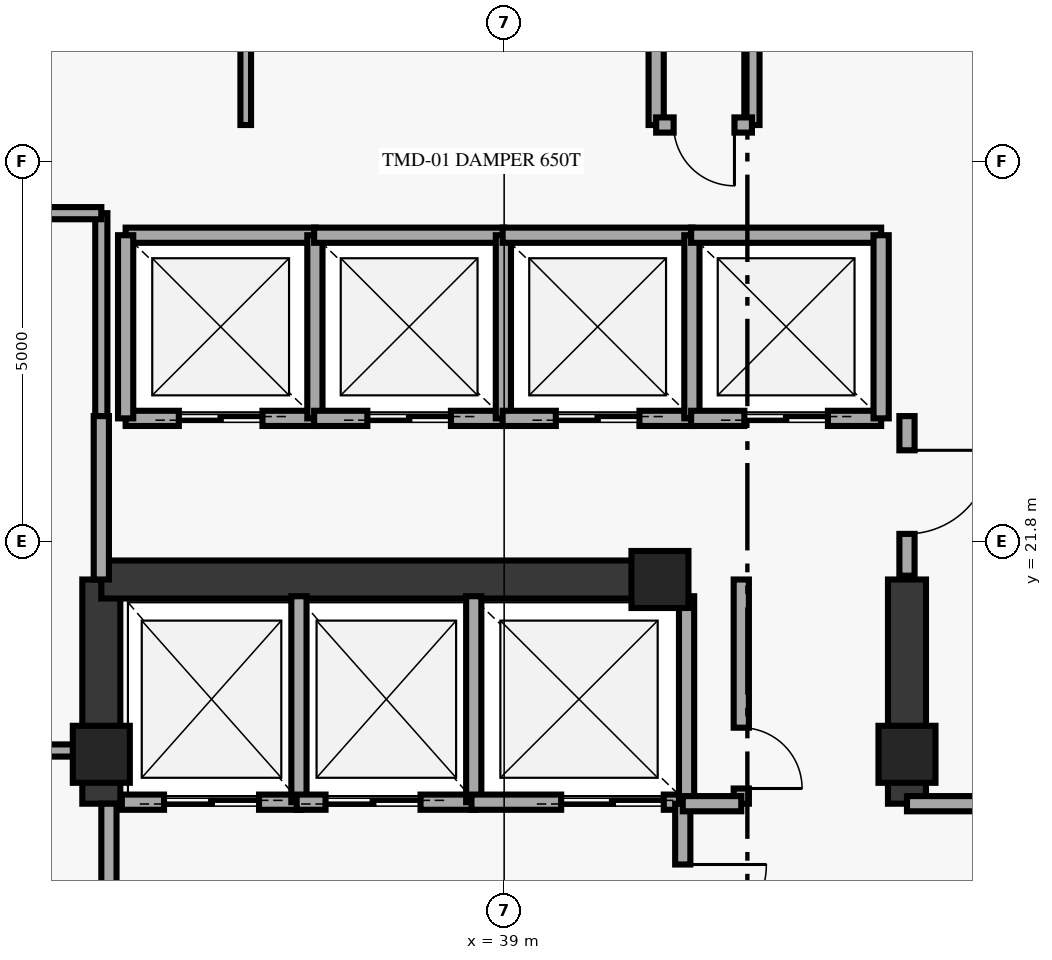
"""IFC4 building model, lengths in metres.
Left out: names, types, materials, properties, quantities, classifications, styles, units other than length and angle.
Written with IfcOpenShell. Run it as: python <this file> out.ifc"""

import sys

from ifc_helpers import new_model, si_unit, direction, frame, frame_2d, origin, origin_2d, place, context, subcontext, project, spatial, rectangle, extrude, element, fill, save


model = new_model("IFC4")
c1 = context("Model", 3, precision=1e-05, world=origin(), true_north=direction((0.0, 1.0)))
c2 = subcontext(c1, "Body", "Model", "MODEL_VIEW")
j1 = project(units=[si_unit("LENGTHUNIT", "METRE"), si_unit("PLANEANGLEUNIT", "RADIAN")], contexts=[c1])
p1 = place(None, origin())
s1 = spatial("IfcSite", under=j1, at=p1, CompositionType="ELEMENT")
p2 = place(p1, origin())
s2 = spatial("IfcBuilding", under=s1, at=p2, CompositionType="ELEMENT")
p3 = place(p2, frame((0.0, 0.0, 306.8)))
s3 = spatial("IfcBuildingStorey", under=s2, at=p3, CompositionType="ELEMENT", Elevation=306.8)
for number, where, z_axis, x_axis in (
    (1, (33.7, 19.0, 0.0), (0.0, 0.0, 1.0), (1.0, 0.0, 0.0)),
    (2, (41.05, 21.3, 0.0), (0.0, 0.0, 1.0), (1.0, 0.0, 0.0)),
    (3, (44.3, 19.0, 0.0), (0.0, 0.0, 1.0), (1.0, 0.0, 0.0)),
):
    element("IfcColumn", number, at=place(p3, frame(where, z_axis=z_axis, x_axis=x_axis)), inside=s3, PredefinedType="PILASTER", context=c2, shape_type="SweptSolid", body=[
        extrude(rectangle(XDim=0.75, YDim=0.75, at=origin_2d()), origin(), (0.0, 0.0, 1.0), 6.18),
    ])
for number, where, z_axis, x_axis in (
    (4, (33.7, 18.35, 0.0), (0.0, 0.0, 1.0), (0.0, 1.0, 0.0)),
    (5, (44.3, 18.35, 0.0), (0.0, 0.0, 1.0), (0.0, 1.0, 0.0)),
):
    element("IfcWall", number, at=place(p3, frame(where, z_axis=z_axis, x_axis=x_axis)), inside=s3, PredefinedType="SHEAR", context=c2, shape_type="SweptSolid", body=[
        extrude(rectangle(XDim=2.95, YDim=0.5, at=frame_2d((1.475, 0.0))), origin(), (0.0, 0.0, 1.0), 6.18),
    ])
p4 = place(p3, frame((33.7, 21.3, 0.0), z_axis=(0.0, 0.0, 1.0), x_axis=(1.0, 0.0, 0.0)))
e6 = element("IfcWall", 6, at=p4, inside=s3, PredefinedType="SHEAR", context=c2, shape_type="SweptSolid", body=[
    extrude(rectangle(XDim=7.55, YDim=0.5, at=frame_2d((3.775, 0.0))), origin(), (0.0, 0.0, 1.0), 6.18),
])
p5 = place(p3, frame((35.6, 27.28, 0.0), z_axis=(0.0, 0.0, 1.0), x_axis=(0.0, 1.0, 0.0)))
e7 = element("IfcWall", 7, at=p5, inside=s3, PredefinedType="PARTITIONING", context=c2, shape_type="SweptSolid", body=[
    extrude(rectangle(XDim=1.77, YDim=0.14, at=frame_2d((0.885, 0.0))), origin(), (0.0, 0.0, 1.0), 6.18),
])
p6 = place(p3, frame((41.0, 27.28, 0.0), z_axis=(0.0, 0.0, 1.0), x_axis=(0.0, 1.0, 0.0)))
e8 = element("IfcWall", 8, at=p6, inside=s3, PredefinedType="SOLIDWALL", context=c2, shape_type="SweptSolid", body=[
    extrude(rectangle(XDim=1.77, YDim=0.2, at=frame_2d((0.885, 0.0))), origin(), (0.0, 0.0, 1.0), 5.23),
])
p7 = place(p3, frame((42.26, 27.28, 0.0), z_axis=(0.0, 0.0, 1.0), x_axis=(0.0, 1.0, 0.0)))
e9 = element("IfcWall", 9, at=p7, inside=s3, PredefinedType="SOLIDWALL", context=c2, shape_type="SweptSolid", body=[
    extrude(rectangle(XDim=1.77, YDim=0.2, at=frame_2d((0.885, 0.0))), origin(), (0.0, 0.0, 1.0), 6.18),
])
p8 = place(p3, frame((41.0, 27.28, 0.0), z_axis=(0.0, 0.0, 1.0), x_axis=(1.0, 0.0, 0.0)))
e10 = element("IfcWall", 10, at=p8, inside=s3, PredefinedType="SOLIDWALL", context=c2, shape_type="SweptSolid", body=[
    extrude(rectangle(XDim=1.26, YDim=0.2, at=frame_2d((0.63, 0.0))), origin(), (0.0, 0.0, 1.0), 6.18),
])
p9 = place(p8, frame((0.23, 0.0, 0.0)))
e11 = element("IfcOpeningElement", 11, at=p9, cuts=e10, PredefinedType="OPENING", context=c2, shape_type="SweptSolid", body=[
    extrude(rectangle(XDim=0.8, YDim=2.05, at=frame_2d((0.4, 1.025))), frame((0.0, 0.11, 0.0), z_axis=(0.0, -1.0, 0.0), x_axis=(1.0, 0.0, 0.0)), (0.0, 0.0, 1.0), 0.22),
])
p10 = place(p3, frame((34.02, 23.42, 0.0), z_axis=(0.0, 0.0, 1.0), x_axis=(1.0, 0.0, 0.0)))
e12 = element("IfcWall", 12, at=p10, inside=s3, PredefinedType="SOLIDWALL", context=c2, shape_type="SweptSolid", body=[
    extrude(rectangle(XDim=2.5, YDim=0.2, at=frame_2d((1.25, 0.0))), origin(), (0.0, 0.0, 1.0), 6.18),
])
p11 = place(p10, frame((0.7, 0.0, 0.0)))
e13 = element("IfcOpeningElement", 13, at=p11, cuts=e12, PredefinedType="OPENING", context=c2, shape_type="SweptSolid", body=[
    extrude(rectangle(XDim=1.1, YDim=2.15, at=frame_2d((0.55, 1.075))), frame((0.0, 0.11, 0.0), z_axis=(0.0, -1.0, 0.0), x_axis=(1.0, 0.0, 0.0)), (0.0, 0.0, 1.0), 0.22),
])
p12 = place(p3, frame((34.02, 25.83, 0.0), z_axis=(0.0, 0.0, 1.0), x_axis=(1.0, 0.0, 0.0)))
e14 = element("IfcWall", 14, at=p12, inside=s3, PredefinedType="SOLIDWALL", context=c2, shape_type="SweptSolid", body=[
    extrude(rectangle(XDim=2.5, YDim=0.2, at=frame_2d((1.25, 0.0))), origin(), (0.0, 0.0, 1.0), 6.18),
])
for number, where, z_axis, x_axis in (
    (15, (34.02, 23.42, 0.0), (0.0, 0.0, 1.0), (0.0, 1.0, 0.0)),
    (16, (36.51, 23.42, 0.0), (0.0, 0.0, 1.0), (0.0, 1.0, 0.0)),
):
    element("IfcWall", number, at=place(p3, frame(where, z_axis=z_axis, x_axis=x_axis)), inside=s3, PredefinedType="SOLIDWALL", context=c2, shape_type="SweptSolid", body=[
        extrude(rectangle(XDim=2.41, YDim=0.2, at=frame_2d((1.205, 0.0))), origin(), (0.0, 0.0, 1.0), 6.18),
    ])
p13 = place(p3, frame((36.5, 23.42, 0.0), z_axis=(0.0, 0.0, 1.0), x_axis=(1.0, 0.0, 0.0)))
e17 = element("IfcWall", 17, at=p13, inside=s3, PredefinedType="SOLIDWALL", context=c2, shape_type="SweptSolid", body=[
    extrude(rectangle(XDim=2.5, YDim=0.2, at=frame_2d((1.25, 0.0))), origin(), (0.0, 0.0, 1.0), 6.18),
])
p14 = place(p13, frame((0.7, 0.0, 0.0)))
e18 = element("IfcOpeningElement", 18, at=p14, cuts=e17, PredefinedType="OPENING", context=c2, shape_type="SweptSolid", body=[
    extrude(rectangle(XDim=1.1, YDim=2.15, at=frame_2d((0.55, 1.075))), frame((0.0, 0.11, 0.0), z_axis=(0.0, -1.0, 0.0), x_axis=(1.0, 0.0, 0.0)), (0.0, 0.0, 1.0), 0.22),
])
p15 = place(p3, frame((36.5, 25.83, 0.0), z_axis=(0.0, 0.0, 1.0), x_axis=(1.0, 0.0, 0.0)))
e19 = element("IfcWall", 19, at=p15, inside=s3, PredefinedType="SOLIDWALL", context=c2, shape_type="SweptSolid", body=[
    extrude(rectangle(XDim=2.5, YDim=0.2, at=frame_2d((1.25, 0.0))), origin(), (0.0, 0.0, 1.0), 6.18),
])
p16 = place(p3, frame((38.99, 23.42, 0.0), z_axis=(0.0, 0.0, 1.0), x_axis=(0.0, 1.0, 0.0)))
e20 = element("IfcWall", 20, at=p16, inside=s3, PredefinedType="SOLIDWALL", context=c2, shape_type="SweptSolid", body=[
    extrude(rectangle(XDim=2.41, YDim=0.2, at=frame_2d((1.205, 0.0))), origin(), (0.0, 0.0, 1.0), 6.18),
])
p17 = place(p3, frame((38.98, 23.42, 0.0), z_axis=(0.0, 0.0, 1.0), x_axis=(1.0, 0.0, 0.0)))
e21 = element("IfcWall", 21, at=p17, inside=s3, PredefinedType="SOLIDWALL", context=c2, shape_type="SweptSolid", body=[
    extrude(rectangle(XDim=2.5, YDim=0.2, at=frame_2d((1.25, 0.0))), origin(), (0.0, 0.0, 1.0), 6.18),
])
p18 = place(p17, frame((0.7, 0.0, 0.0)))
e22 = element("IfcOpeningElement", 22, at=p18, cuts=e21, PredefinedType="OPENING", context=c2, shape_type="SweptSolid", body=[
    extrude(rectangle(XDim=1.1, YDim=2.15, at=frame_2d((0.55, 1.075))), frame((0.0, 0.11, 0.0), z_axis=(0.0, -1.0, 0.0), x_axis=(1.0, 0.0, 0.0)), (0.0, 0.0, 1.0), 0.22),
])
p19 = place(p3, frame((38.98, 25.83, 0.0), z_axis=(0.0, 0.0, 1.0), x_axis=(1.0, 0.0, 0.0)))
e23 = element("IfcWall", 23, at=p19, inside=s3, PredefinedType="SOLIDWALL", context=c2, shape_type="SweptSolid", body=[
    extrude(rectangle(XDim=2.5, YDim=0.2, at=frame_2d((1.25, 0.0))), origin(), (0.0, 0.0, 1.0), 6.18),
])
p20 = place(p3, frame((41.47, 23.42, 0.0), z_axis=(0.0, 0.0, 1.0), x_axis=(0.0, 1.0, 0.0)))
e24 = element("IfcWall", 24, at=p20, inside=s3, PredefinedType="SOLIDWALL", context=c2, shape_type="SweptSolid", body=[
    extrude(rectangle(XDim=2.41, YDim=0.2, at=frame_2d((1.205, 0.0))), origin(), (0.0, 0.0, 1.0), 6.18),
])
p21 = place(p3, frame((41.46, 23.42, 0.0), z_axis=(0.0, 0.0, 1.0), x_axis=(1.0, 0.0, 0.0)))
e25 = element("IfcWall", 25, at=p21, inside=s3, PredefinedType="SOLIDWALL", context=c2, shape_type="SweptSolid", body=[
    extrude(rectangle(XDim=2.5, YDim=0.2, at=frame_2d((1.25, 0.0))), origin(), (0.0, 0.0, 1.0), 6.18),
])
p22 = place(p21, frame((0.7, 0.0, 0.0)))
e26 = element("IfcOpeningElement", 26, at=p22, cuts=e25, PredefinedType="OPENING", context=c2, shape_type="SweptSolid", body=[
    extrude(rectangle(XDim=1.1, YDim=2.15, at=frame_2d((0.55, 1.075))), frame((0.0, 0.11, 0.0), z_axis=(0.0, -1.0, 0.0), x_axis=(1.0, 0.0, 0.0)), (0.0, 0.0, 1.0), 0.22),
])
p23 = place(p3, frame((41.46, 25.83, 0.0), z_axis=(0.0, 0.0, 1.0), x_axis=(1.0, 0.0, 0.0)))
e27 = element("IfcWall", 27, at=p23, inside=s3, PredefinedType="SOLIDWALL", context=c2, shape_type="SweptSolid", body=[
    extrude(rectangle(XDim=2.5, YDim=0.2, at=frame_2d((1.25, 0.0))), origin(), (0.0, 0.0, 1.0), 6.18),
])
p24 = place(p3, frame((43.96, 23.42, 0.0), z_axis=(0.0, 0.0, 1.0), x_axis=(0.0, 1.0, 0.0)))
e28 = element("IfcWall", 28, at=p24, inside=s3, PredefinedType="SOLIDWALL", context=c2, shape_type="SweptSolid", body=[
    extrude(rectangle(XDim=2.41, YDim=0.2, at=frame_2d((1.205, 0.0))), origin(), (0.0, 0.0, 1.0), 6.18),
])
p25 = place(p3, frame((33.97, 18.37, 0.0), z_axis=(0.0, 0.0, 1.0), x_axis=(1.0, 0.0, 0.0)))
e29 = element("IfcWall", 29, at=p25, inside=s3, PredefinedType="SOLIDWALL", context=c2, shape_type="SweptSolid", body=[
    extrude(rectangle(XDim=2.36, YDim=0.2, at=frame_2d((1.18, 0.0))), origin(), (0.0, 0.0, 1.0), 6.18),
])
p26 = place(p25, frame((0.555, 0.0, 0.0)))
e30 = element("IfcOpeningElement", 30, at=p26, cuts=e29, PredefinedType="OPENING", context=c2, shape_type="SweptSolid", body=[
    extrude(rectangle(XDim=1.25, YDim=2.2, at=frame_2d((0.625, 1.1))), frame((0.0, 0.11, 0.0), z_axis=(0.0, -1.0, 0.0), x_axis=(1.0, 0.0, 0.0)), (0.0, 0.0, 1.0), 0.22),
])
p27 = place(p3, frame((36.3, 18.37, 0.0), z_axis=(0.0, 0.0, 1.0), x_axis=(0.0, 1.0, 0.0)))
e31 = element("IfcWall", 31, at=p27, inside=s3, PredefinedType="SOLIDWALL", context=c2, shape_type="SweptSolid", body=[
    extrude(rectangle(XDim=2.71, YDim=0.2, at=frame_2d((1.355, 0.0))), origin(), (0.0, 0.0, 1.0), 6.18),
])
p28 = place(p3, frame((36.27, 18.37, 0.0), z_axis=(0.0, 0.0, 1.0), x_axis=(1.0, 0.0, 0.0)))
e32 = element("IfcWall", 32, at=p28, inside=s3, PredefinedType="SOLIDWALL", context=c2, shape_type="SweptSolid", body=[
    extrude(rectangle(XDim=2.36, YDim=0.2, at=frame_2d((1.18, 0.0))), origin(), (0.0, 0.0, 1.0), 6.18),
])
p29 = place(p28, frame((0.38, 0.0, 0.0)))
e33 = element("IfcOpeningElement", 33, at=p29, cuts=e32, PredefinedType="OPENING", context=c2, shape_type="SweptSolid", body=[
    extrude(rectangle(XDim=1.25, YDim=2.2, at=frame_2d((0.625, 1.1))), frame((0.0, 0.11, 0.0), z_axis=(0.0, -1.0, 0.0), x_axis=(1.0, 0.0, 0.0)), (0.0, 0.0, 1.0), 0.22),
])
p30 = place(p3, frame((38.6, 18.37, 0.0), z_axis=(0.0, 0.0, 1.0), x_axis=(0.0, 1.0, 0.0)))
e34 = element("IfcWall", 34, at=p30, inside=s3, PredefinedType="SOLIDWALL", context=c2, shape_type="SweptSolid", body=[
    extrude(rectangle(XDim=2.71, YDim=0.2, at=frame_2d((1.355, 0.0))), origin(), (0.0, 0.0, 1.0), 6.18),
])
p31 = place(p3, frame((38.57, 18.37, 0.0), z_axis=(0.0, 0.0, 1.0), x_axis=(1.0, 0.0, 0.0)))
e35 = element("IfcWall", 35, at=p31, inside=s3, PredefinedType="SOLIDWALL", context=c2, shape_type="SweptSolid", body=[
    extrude(rectangle(XDim=2.83, YDim=0.2, at=frame_2d((1.415, 0.0))), origin(), (0.0, 0.0, 1.0), 6.18),
])
p32 = place(p31, frame((1.18, 0.0, 0.0)))
e36 = element("IfcOpeningElement", 36, at=p32, cuts=e35, PredefinedType="OPENING", context=c2, shape_type="SweptSolid", body=[
    extrude(rectangle(XDim=1.35, YDim=2.18, at=frame_2d((0.675, 1.09))), frame((0.0, 0.11, 0.0), z_axis=(0.0, -1.0, 0.0), x_axis=(1.0, 0.0, 0.0)), (0.0, 0.0, 1.0), 0.22),
])
p33 = place(p3, frame((41.4, 18.37, 0.0), z_axis=(0.0, 0.0, 1.0), x_axis=(0.0, 1.0, 0.0)))
e37 = element("IfcWall", 37, at=p33, inside=s3, PredefinedType="SOLIDWALL", context=c2, shape_type="SweptSolid", body=[
    extrude(rectangle(XDim=2.71, YDim=0.2, at=frame_2d((1.355, 0.0))), origin(), (0.0, 0.0, 1.0), 6.18),
])
p34 = place(p3, frame((29.05, 19.05, 0.0), z_axis=(0.0, 0.0, 1.0), x_axis=(1.0, 0.0, 0.0)))
e38 = element("IfcWall", 38, at=p34, inside=s3, PredefinedType="PARTITIONING", context=c2, shape_type="SweptSolid", body=[
    extrude(rectangle(XDim=4.65, YDim=0.16, at=frame_2d((2.325, 0.0))), origin(), (0.0, 0.0, 1.0), 6.18),
])
p35 = place(p3, frame((33.7, 23.45, 0.0), z_axis=(0.0, 0.0, 1.0), x_axis=(0.0, 1.0, 0.0)))
e39 = element("IfcWall", 39, at=p35, inside=s3, PredefinedType="PARTITIONING", context=c2, shape_type="SweptSolid", body=[
    extrude(rectangle(XDim=2.67, YDim=0.16, at=frame_2d((1.335, 0.0))), origin(), (0.0, 0.0, 1.0), 6.18),
])
p36 = place(p3, frame((33.7, 26.12, 0.0), z_axis=(0.0, 0.0, 1.0), x_axis=(-1.0, 0.0, 0.0)))
e40 = element("IfcWall", 40, at=p36, inside=s3, PredefinedType="PARTITIONING", context=c2, shape_type="SweptSolid", body=[
    extrude(rectangle(XDim=4.65, YDim=0.16, at=frame_2d((2.325, 0.0))), origin(), (0.0, 0.0, 1.0), 6.18),
])
p37 = place(p36, frame((3.1, 0.0, 0.0)))
e41 = element("IfcOpeningElement", 41, at=p37, cuts=e40, PredefinedType="OPENING", context=c2, shape_type="SweptSolid", body=[
    extrude(rectangle(XDim=0.9, YDim=2.1, at=frame_2d((0.45, 1.05))), frame((0.0, 0.09, 0.0), z_axis=(0.0, -1.0, 0.0), x_axis=(1.0, 0.0, 0.0)), (0.0, 0.0, 1.0), 0.18),
])
p38 = place(p36, frame((0.9, 0.0, 0.0)))
e42 = element("IfcOpeningElement", 42, at=p38, cuts=e40, PredefinedType="OPENING", context=c2, shape_type="SweptSolid", body=[
    extrude(rectangle(XDim=0.9, YDim=2.1, at=frame_2d((0.45, 1.05))), frame((0.0, 0.09, 0.0), z_axis=(0.0, -1.0, 0.0), x_axis=(1.0, 0.0, 0.0)), (0.0, 0.0, 1.0), 0.18),
])
p39 = place(p3, frame((33.7, 21.3, 0.0), z_axis=(0.0, 0.0, 1.0), x_axis=(0.0, 1.0, 0.0)))
e43 = element("IfcWall", 43, at=p39, inside=s3, PredefinedType="SOLIDWALL", context=c2, shape_type="SweptSolid", body=[
    extrude(rectangle(XDim=2.15, YDim=0.2, at=frame_2d((1.075, 0.0))), origin(), (0.0, 0.0, 1.0), 6.18),
])
p40 = place(p3, frame((44.3, 21.35, 0.0), z_axis=(0.0, 0.0, 1.0), x_axis=(0.0, 1.0, 0.0)))
e44 = element("IfcWall", 44, at=p40, inside=s3, PredefinedType="SOLIDWALL", context=c2, shape_type="SweptSolid", body=[
    extrude(rectangle(XDim=2.1, YDim=0.2, at=frame_2d((1.05, 0.0))), origin(), (0.0, 0.0, 1.0), 6.18),
])
p41 = place(p40, frame((0.55, 0.0, 0.0)))
e45 = element("IfcOpeningElement", 45, at=p41, cuts=e44, PredefinedType="OPENING", context=c2, shape_type="SweptSolid", body=[
    extrude(rectangle(XDim=1.1, YDim=2.15, at=frame_2d((0.55, 1.075))), frame((0.0, 0.11, 0.0), z_axis=(0.0, -1.0, 0.0), x_axis=(1.0, 0.0, 0.0)), (0.0, 0.0, 1.0), 0.22),
])
p42 = place(p3, frame((33.8, 15.55, 0.0), z_axis=(0.0, 0.0, 1.0), x_axis=(0.0, 1.0, 0.0)))
e46 = element("IfcWall", 46, at=p42, inside=s3, PredefinedType="SOLIDWALL", context=c2, shape_type="SweptSolid", body=[
    extrude(rectangle(XDim=2.8, YDim=0.2, at=frame_2d((1.4, 0.0))), origin(), (0.0, 0.0, 1.0), 6.18),
])
p43 = place(p3, frame((41.35, 15.55, 0.0), z_axis=(0.0, 0.0, 1.0), x_axis=(0.0, 1.0, 0.0)))
e47 = element("IfcWall", 47, at=p43, inside=s3, PredefinedType="SOLIDWALL", context=c2, shape_type="SweptSolid", body=[
    extrude(rectangle(XDim=2.8, YDim=0.2, at=frame_2d((1.4, 0.0))), origin(), (0.0, 0.0, 1.0), 6.18),
])
p44 = place(p43, frame((0.9, 0.0, 0.0)))
e48 = element("IfcOpeningElement", 48, at=p44, cuts=e47, PredefinedType="OPENING", context=c2, shape_type="SweptSolid", body=[
    extrude(rectangle(XDim=1.1, YDim=2.15, at=frame_2d((0.55, 1.075))), frame((0.0, 0.11, 0.0), z_axis=(0.0, -1.0, 0.0), x_axis=(1.0, 0.0, 0.0)), (0.0, 0.0, 1.0), 0.22),
])
p45 = place(p3, frame((44.3, 18.35, 0.0), z_axis=(0.0, 0.0, 1.0), x_axis=(1.0, 0.0, 0.0)))
e49 = element("IfcWall", 49, at=p45, inside=s3, PredefinedType="SOLIDWALL", context=c2, shape_type="SweptSolid", body=[
    extrude(rectangle(XDim=1.55, YDim=0.2, at=frame_2d((0.775, 0.0))), origin(), (0.0, 0.0, 1.0), 6.18),
])
p46 = place(p3, frame((42.12, 18.35, 0.0), z_axis=(0.0, 0.0, 1.0), x_axis=(0.0, 1.0, 0.0)))
e50 = element("IfcWall", 50, at=p46, inside=s3, PredefinedType="SOLIDWALL", context=c2, shape_type="SweptSolid", body=[
    extrude(rectangle(XDim=2.95, YDim=0.2, at=frame_2d((1.475, 0.0))), origin(), (0.0, 0.0, 1.0), 6.18),
])
p47 = place(p46, frame((0.2, 0.0, 0.0)))
e51 = element("IfcOpeningElement", 51, at=p47, cuts=e50, PredefinedType="OPENING", context=c2, shape_type="SweptSolid", body=[
    extrude(rectangle(XDim=0.8, YDim=2.05, at=frame_2d((0.4, 1.025))), frame((0.0, 0.11, 0.0), z_axis=(0.0, -1.0, 0.0), x_axis=(1.0, 0.0, 0.0)), (0.0, 0.0, 1.0), 0.22),
])
p48 = place(p3, frame((41.35, 18.35, 0.0), z_axis=(0.0, 0.0, 1.0), x_axis=(1.0, 0.0, 0.0)))
e52 = element("IfcWall", 52, at=p48, inside=s3, PredefinedType="SOLIDWALL", context=c2, shape_type="SweptSolid", body=[
    extrude(rectangle(XDim=0.77, YDim=0.2, at=frame_2d((0.385, 0.0))), origin(), (0.0, 0.0, 1.0), 6.18),
])
p49 = place(p9, origin())
e53 = element("IfcDoor", 53, at=p49, inside=s3, OperationType="SINGLE_SWING_RIGHT", PredefinedType="DOOR", context=c2, shape_type="SweptSolid", body=[
    extrude(rectangle(XDim=0.8, YDim=2.05, at=frame_2d((0.4, 1.025))), frame((0.0, 0.025, 0.0), z_axis=(0.0, -1.0, 0.0), x_axis=(1.0, 0.0, 0.0)), (0.0, 0.0, 1.0), 0.05),
])
fill(e11, e53)
p50 = place(p11, origin())
e54 = element("IfcDoor", 54, at=p50, inside=s3, OperationType="DOUBLE_DOOR_SLIDING", PredefinedType="DOOR", context=c2, shape_type="SweptSolid", body=[
    extrude(rectangle(XDim=1.1, YDim=2.15, at=frame_2d((0.55, 1.075))), frame((0.0, 0.025, 0.0), z_axis=(0.0, -1.0, 0.0), x_axis=(1.0, 0.0, 0.0)), (0.0, 0.0, 1.0), 0.05),
])
fill(e13, e54)
p51 = place(p14, origin())
e55 = element("IfcDoor", 55, at=p51, inside=s3, OperationType="DOUBLE_DOOR_SLIDING", PredefinedType="DOOR", context=c2, shape_type="SweptSolid", body=[
    extrude(rectangle(XDim=1.1, YDim=2.15, at=frame_2d((0.55, 1.075))), frame((0.0, 0.025, 0.0), z_axis=(0.0, -1.0, 0.0), x_axis=(1.0, 0.0, 0.0)), (0.0, 0.0, 1.0), 0.05),
])
fill(e18, e55)
p52 = place(p18, origin())
e56 = element("IfcDoor", 56, at=p52, inside=s3, OperationType="DOUBLE_DOOR_SLIDING", PredefinedType="DOOR", context=c2, shape_type="SweptSolid", body=[
    extrude(rectangle(XDim=1.1, YDim=2.15, at=frame_2d((0.55, 1.075))), frame((0.0, 0.025, 0.0), z_axis=(0.0, -1.0, 0.0), x_axis=(1.0, 0.0, 0.0)), (0.0, 0.0, 1.0), 0.05),
])
fill(e22, e56)
p53 = place(p22, origin())
e57 = element("IfcDoor", 57, at=p53, inside=s3, OperationType="DOUBLE_DOOR_SLIDING", PredefinedType="DOOR", context=c2, shape_type="SweptSolid", body=[
    extrude(rectangle(XDim=1.1, YDim=2.15, at=frame_2d((0.55, 1.075))), frame((0.0, 0.025, 0.0), z_axis=(0.0, -1.0, 0.0), x_axis=(1.0, 0.0, 0.0)), (0.0, 0.0, 1.0), 0.05),
])
fill(e26, e57)
p54 = place(p26, origin())
e58 = element("IfcDoor", 58, at=p54, inside=s3, OperationType="DOUBLE_DOOR_SLIDING", PredefinedType="DOOR", context=c2, shape_type="SweptSolid", body=[
    extrude(rectangle(XDim=1.25, YDim=2.2, at=frame_2d((0.625, 1.1))), frame((0.0, 0.025, 0.0), z_axis=(0.0, -1.0, 0.0), x_axis=(1.0, 0.0, 0.0)), (0.0, 0.0, 1.0), 0.05),
])
fill(e30, e58)
p55 = place(p29, origin())
e59 = element("IfcDoor", 59, at=p55, inside=s3, OperationType="DOUBLE_DOOR_SLIDING", PredefinedType="DOOR", context=c2, shape_type="SweptSolid", body=[
    extrude(rectangle(XDim=1.25, YDim=2.2, at=frame_2d((0.625, 1.1))), frame((0.0, 0.025, 0.0), z_axis=(0.0, -1.0, 0.0), x_axis=(1.0, 0.0, 0.0)), (0.0, 0.0, 1.0), 0.05),
])
fill(e33, e59)
p56 = place(p32, origin())
e60 = element("IfcDoor", 60, at=p56, inside=s3, OperationType="DOUBLE_DOOR_SLIDING", PredefinedType="DOOR", context=c2, shape_type="SweptSolid", body=[
    extrude(rectangle(XDim=1.35, YDim=2.18, at=frame_2d((0.675, 1.09))), frame((0.0, 0.025, 0.0), z_axis=(0.0, -1.0, 0.0), x_axis=(1.0, 0.0, 0.0)), (0.0, 0.0, 1.0), 0.05),
])
fill(e36, e60)
p57 = place(p41, origin())
e61 = element("IfcDoor", 61, at=p57, inside=s3, OperationType="SINGLE_SWING_RIGHT", PredefinedType="DOOR", context=c2, shape_type="SweptSolid", body=[
    extrude(rectangle(XDim=1.1, YDim=2.15, at=frame_2d((0.55, 1.075))), frame((0.0, 0.025, 0.0), z_axis=(0.0, -1.0, 0.0), x_axis=(1.0, 0.0, 0.0)), (0.0, 0.0, 1.0), 0.05),
])
fill(e45, e61)
p58 = place(p44, origin())
e62 = element("IfcDoor", 62, at=p58, inside=s3, OperationType="SINGLE_SWING_RIGHT", PredefinedType="DOOR", context=c2, shape_type="SweptSolid", body=[
    extrude(rectangle(XDim=1.1, YDim=2.15, at=frame_2d((0.55, 1.075))), frame((0.0, 0.025, 0.0), z_axis=(0.0, -1.0, 0.0), x_axis=(1.0, 0.0, 0.0)), (0.0, 0.0, 1.0), 0.05),
])
fill(e48, e62)
p59 = place(p47, origin())
e63 = element("IfcDoor", 63, at=p59, inside=s3, OperationType="SINGLE_SWING_LEFT", PredefinedType="DOOR", context=c2, shape_type="SweptSolid", body=[
    extrude(rectangle(XDim=0.8, YDim=2.05, at=frame_2d((0.4, 1.025))), frame((0.0, 0.025, 0.0), z_axis=(0.0, -1.0, 0.0), x_axis=(1.0, 0.0, 0.0)), (0.0, 0.0, 1.0), 0.05),
])
fill(e51, e63)
save(model, sys.argv[1])
